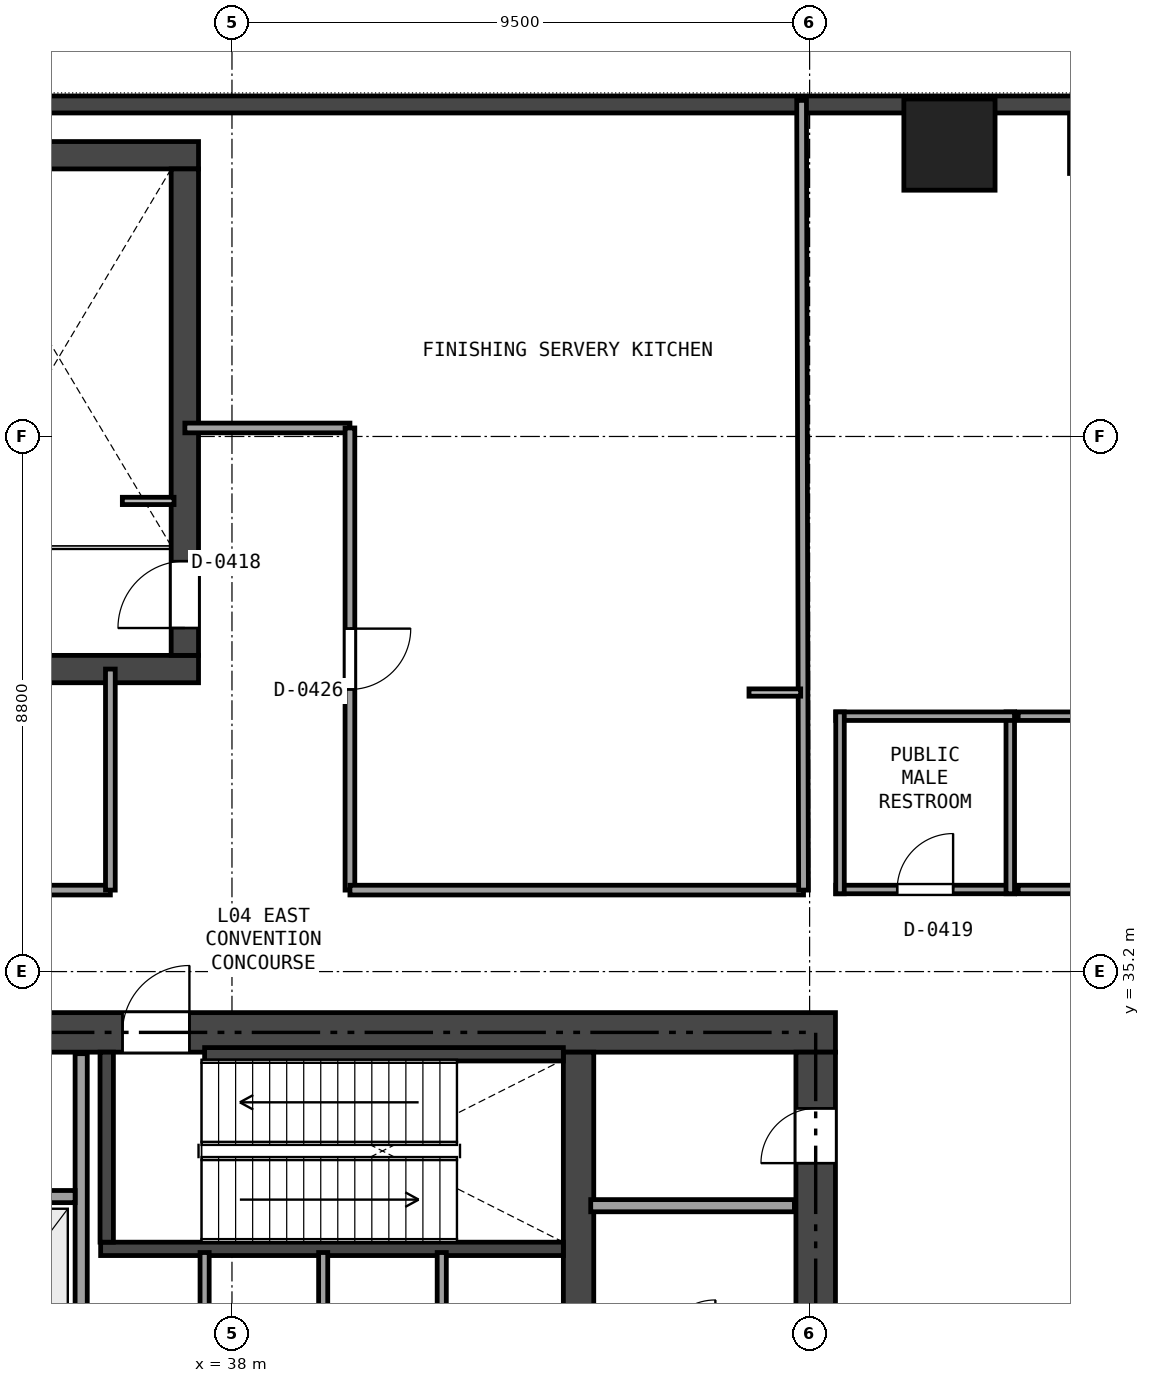
"""IFC4 building model, lengths in metres.
Left out: names, types, materials, properties, quantities, classifications, styles, units other than length and angle.
Written with IfcOpenShell. Run it as: python <this file> out.ifc"""

import sys

from ifc_helpers import new_model, si_unit, direction, frame, frame_2d, origin, origin_2d, place, context, subcontext, project, spatial, rectangle, extrude, element, fill, save


model = new_model("IFC4")
c1 = context("Model", 3, precision=1e-05, world=origin(), true_north=direction((0.0, 1.0)))
c2 = subcontext(c1, "Body", "Model", "MODEL_VIEW")
j1 = project(units=[si_unit("LENGTHUNIT", "METRE"), si_unit("PLANEANGLEUNIT", "RADIAN")], contexts=[c1])
p1 = place(None, origin())
s1 = spatial("IfcSite", under=j1, at=p1, CompositionType="ELEMENT")
p2 = place(p1, origin())
s2 = spatial("IfcBuilding", under=s1, at=p2, CompositionType="ELEMENT")
p3 = place(p2, frame((0.0, 0.0, 21.6)))
s3 = spatial("IfcBuildingStorey", under=s2, at=p3, CompositionType="ELEMENT", Elevation=21.6)
p4 = place(p3, frame((26.475, 34.2, 0.0), z_axis=(0.0, 0.0, 1.0), x_axis=(1.0, 0.0, 0.0)))
e1 = element("IfcWall", 1, at=p4, inside=s3, PredefinedType="SHEAR", context=c2, shape_type="SweptSolid", body=[
    extrude(rectangle(XDim=21.45, YDim=0.65, at=frame_2d((10.725, 0.0))), origin(), (0.0, 0.0, 1.0), 4.98),
])
p5 = place(p4, frame((9.725, 0.0, 0.0)))
e2 = element("IfcOpeningElement", 2, at=p5, cuts=e1, PredefinedType="OPENING", context=c2, shape_type="SweptSolid", body=[
    extrude(rectangle(XDim=1.1, YDim=2.15, at=frame_2d((0.55, 1.075))), frame((0.0, 0.335, 0.0), z_axis=(0.0, -1.0, 0.0), x_axis=(1.0, 0.0, 0.0)), (0.0, 0.0, 1.0), 0.67),
])
p6 = place(p4, frame((1.975, 0.0, 0.0)))
e3 = element("IfcOpeningElement", 3, at=p6, cuts=e1, PredefinedType="OPENING", context=c2, shape_type="SweptSolid", body=[
    extrude(rectangle(XDim=0.9, YDim=2.1, at=frame_2d((0.45, 1.05))), frame((0.0, 0.335, 0.0), z_axis=(0.0, -1.0, 0.0), x_axis=(1.0, 0.0, 0.0)), (0.0, 0.0, 1.0), 0.67),
])
p7 = place(p4, frame((6.275, 0.0, 0.0)))
e4 = element("IfcOpeningElement", 4, at=p7, cuts=e1, PredefinedType="OPENING", context=c2, shape_type="SweptSolid", body=[
    extrude(rectangle(XDim=0.9, YDim=2.1, at=frame_2d((0.45, 1.05))), frame((0.0, 0.335, 0.0), z_axis=(0.0, -1.0, 0.0), x_axis=(1.0, 0.0, 0.0)), (0.0, 0.0, 1.0), 0.67),
])
p8 = place(p3, frame((47.6, 18.925, 0.0), z_axis=(0.0, 0.0, 1.0), x_axis=(0.0, 1.0, 0.0)))
e5 = element("IfcWall", 5, at=p8, inside=s3, PredefinedType="SHEAR", context=c2, shape_type="SweptSolid", body=[
    extrude(rectangle(XDim=14.95, YDim=0.65, at=frame_2d((7.475, 0.0))), origin(), (0.0, 0.0, 1.0), 4.98),
])
p9 = place(p8, frame((6.575, 0.0, 0.0)))
e6 = element("IfcOpeningElement", 6, at=p9, cuts=e5, PredefinedType="OPENING", context=c2, shape_type="SweptSolid", body=[
    extrude(rectangle(XDim=1.1, YDim=2.15, at=frame_2d((0.55, 1.075))), frame((0.0, 0.335, 0.0), z_axis=(0.0, -1.0, 0.0), x_axis=(1.0, 0.0, 0.0)), (0.0, 0.0, 1.0), 0.67),
])
p10 = place(p8, frame((8.475, 0.0, 0.0)))
e7 = element("IfcOpeningElement", 7, at=p10, cuts=e5, PredefinedType="OPENING", context=c2, shape_type="SweptSolid", body=[
    extrude(rectangle(XDim=0.9, YDim=2.1, at=frame_2d((0.45, 1.05))), frame((0.0, 0.335, 0.0), z_axis=(0.0, -1.0, 0.0), x_axis=(1.0, 0.0, 0.0)), (0.0, 0.0, 1.0), 0.67),
])
p11 = place(p8, frame((13.125, 0.0, 0.0)))
e8 = element("IfcOpeningElement", 8, at=p11, cuts=e5, PredefinedType="OPENING", context=c2, shape_type="SweptSolid", body=[
    extrude(rectangle(XDim=0.9, YDim=2.1, at=frame_2d((0.45, 1.05))), frame((0.0, 0.335, 0.0), z_axis=(0.0, -1.0, 0.0), x_axis=(1.0, 0.0, 0.0)), (0.0, 0.0, 1.0), 0.67),
])
p12 = place(p3, frame((43.7, 18.925, 0.0), z_axis=(0.0, 0.0, 1.0), x_axis=(0.0, 1.0, 0.0)))
e9 = element("IfcWall", 9, at=p12, inside=s3, PredefinedType="SHEAR", context=c2, shape_type="SweptSolid", body=[
    extrude(rectangle(XDim=14.95, YDim=0.5, at=frame_2d((7.475, 0.0))), origin(), (0.0, 0.0, 1.0), 4.98),
])
p13 = place(p12, frame((8.075, 0.0, 0.0)))
e10 = element("IfcOpeningElement", 10, at=p13, cuts=e9, PredefinedType="OPENING", context=c2, shape_type="SweptSolid", body=[
    extrude(rectangle(XDim=0.9, YDim=2.1, at=frame_2d((0.45, 1.05))), frame((0.0, 0.26, 0.0), z_axis=(0.0, -1.0, 0.0), x_axis=(1.0, 0.0, 0.0)), (0.0, 0.0, 1.0), 0.52),
])
p14 = place(p3, frame((35.84, 30.64, 0.0), z_axis=(0.0, 0.0, 1.0), x_axis=(1.0, 0.0, 0.0)))
e11 = element("IfcWall", 11, at=p14, inside=s3, PredefinedType="SHEAR", context=c2, shape_type="SweptSolid", body=[
    extrude(rectangle(XDim=7.61, YDim=0.22, at=frame_2d((3.805, 0.0))), origin(), (0.0, 0.0, 1.0), 4.98),
])
p15 = place(p3, frame((35.94, 30.75, 0.0), z_axis=(0.0, 0.0, 1.0), x_axis=(0.0, 1.0, 0.0)))
e12 = element("IfcWall", 12, at=p15, inside=s3, PredefinedType="SHEAR", context=c2, shape_type="SweptSolid", body=[
    extrude(rectangle(XDim=3.125, YDim=0.22, at=frame_2d((1.562, 0.0))), origin(), (0.0, 0.0, 1.0), 4.98),
])
p16 = place(p3, frame((37.55, 33.84, 0.0), z_axis=(0.0, 0.0, 1.0), x_axis=(1.0, 0.0, 0.0)))
e13 = element("IfcWall", 13, at=p16, inside=s3, PredefinedType="SHEAR", context=c2, shape_type="SweptSolid", body=[
    extrude(rectangle(XDim=5.9, YDim=0.22, at=frame_2d((2.95, 0.0))), origin(), (0.0, 0.0, 1.0), 4.98),
])
for number, where, z_axis, x_axis in (
    (14, (32.85, 40.175, 0.0), (0.0, 0.0, 1.0), (1.0, 0.0, 0.0)),
    (15, (32.85, 48.625, 0.0), (0.0, 0.0, 1.0), (1.0, 0.0, 0.0)),
):
    element("IfcWall", number, at=place(p3, frame(where, z_axis=z_axis, x_axis=x_axis)), inside=s3, PredefinedType="SHEAR", context=c2, shape_type="SweptSolid", body=[
        extrude(rectangle(XDim=4.6, YDim=0.45, at=frame_2d((2.3, 0.0))), origin(), (0.0, 0.0, 1.0), 4.98),
    ])
p17 = place(p3, frame((37.225, 40.4, 0.0), z_axis=(0.0, 0.0, 1.0), x_axis=(0.0, 1.0, 0.0)))
e16 = element("IfcWall", 16, at=p17, inside=s3, PredefinedType="SHEAR", context=c2, shape_type="SweptSolid", body=[
    extrude(rectangle(XDim=8.0, YDim=0.45, at=frame_2d((4.0, 0.0))), origin(), (0.0, 0.0, 1.0), 4.98),
])
p18 = place(p17, frame((0.45, 0.0, 0.0)))
e17 = element("IfcOpeningElement", 17, at=p18, cuts=e16, PredefinedType="OPENING", context=c2, shape_type="SweptSolid", body=[
    extrude(rectangle(XDim=1.1, YDim=2.15, at=frame_2d((0.55, 1.075))), frame((0.0, 0.235, 0.0), z_axis=(0.0, -1.0, 0.0), x_axis=(1.0, 0.0, 0.0)), (0.0, 0.0, 1.0), 0.47),
])
p19 = place(p3, frame((49.8, 48.8, 0.0), z_axis=(0.0, 0.0, 1.0), x_axis=(1.0, 0.0, 0.0)))
e18 = element("IfcColumn", 18, at=p19, inside=s3, PredefinedType="COLUMN", context=c2, shape_type="SweptSolid", body=[
    extrude(rectangle(XDim=1.5, YDim=1.5, at=origin_2d()), origin(), (0.0, 0.0, 1.0), 4.98),
])
p20 = place(p3, frame((52.0, 48.8, 0.0), z_axis=(0.0, 0.0, 1.0), x_axis=(1.0, 0.0, 0.0)))
e19 = element("IfcColumn", 19, at=p20, inside=s3, PredefinedType="PILASTER", context=c2, shape_type="SweptSolid", body=[
    extrude(rectangle(XDim=0.45, YDim=0.95, at=origin_2d()), origin(), (0.0, 0.0, 1.0), 4.98),
])
p21 = place(p3, frame((6.54, 49.46, 0.0), z_axis=(0.0, 0.0, 1.0), x_axis=(1.0, 0.0, 0.0)))
e20 = element("IfcWall", 20, at=p21, inside=s3, PredefinedType="SOLIDWALL", context=c2, shape_type="SweptSolid", body=[
    extrude(rectangle(XDim=61.32, YDim=0.28, at=frame_2d((30.66, 0.0))), origin(), (0.0, 0.0, 1.0), 4.98),
])
p22 = place(p3, frame((43.9, 31.35, 0.0), z_axis=(0.0, 0.0, 1.0), x_axis=(1.0, 0.0, 0.0)))
e21 = element("IfcWall", 21, at=p22, inside=s3, PredefinedType="SOLIDWALL", context=c2, shape_type="SweptSolid", body=[
    extrude(rectangle(XDim=3.35, YDim=0.2, at=frame_2d((1.675, 0.0))), origin(), (0.0, 0.0, 1.0), 4.98),
])
p23 = place(p3, frame((35.52, 18.95, 0.0), z_axis=(0.0, 0.0, 1.0), x_axis=(0.0, 1.0, 0.0)))
e22 = element("IfcWall", 22, at=p23, inside=s3, PredefinedType="SOLIDWALL", context=c2, shape_type="SweptSolid", body=[
    extrude(rectangle(XDim=14.9, YDim=0.2, at=frame_2d((7.45, 0.0))), origin(), (0.0, 0.0, 1.0), 4.501),
])
p24 = place(p23, frame((7.755, 0.0, 0.0)))
e23 = element("IfcOpeningElement", 23, at=p24, cuts=e22, PredefinedType="OPENING", context=c2, shape_type="SweptSolid", body=[
    extrude(rectangle(XDim=0.95, YDim=2.15, at=frame_2d((0.475, 1.075))), frame((0.0, 0.11, 0.0), z_axis=(0.0, -1.0, 0.0), x_axis=(1.0, 0.0, 0.0)), (0.0, 0.0, 1.0), 0.22),
])
p25 = place(p23, frame((0.6, 0.0, 0.0)))
e24 = element("IfcOpeningElement", 24, at=p25, cuts=e22, PredefinedType="OPENING", context=c2, shape_type="SweptSolid", body=[
    extrude(rectangle(XDim=0.9, YDim=2.1, at=frame_2d((0.45, 1.05))), frame((0.0, 0.11, 0.0), z_axis=(0.0, -1.0, 0.0), x_axis=(1.0, 0.0, 0.0)), (0.0, 0.0, 1.0), 0.22),
])
p26 = place(p3, frame((31.0, 31.5, 0.0), z_axis=(0.0, 0.0, 1.0), x_axis=(1.0, 0.0, 0.0)))
e25 = element("IfcWall", 25, at=p26, inside=s3, PredefinedType="SOLIDWALL", context=c2, shape_type="SweptSolid", body=[
    extrude(rectangle(XDim=4.42, YDim=0.2, at=frame_2d((2.21, 0.0))), origin(), (0.0, 0.0, 1.0), 4.98),
])
for number, where, z_axis, x_axis in (
    (26, (37.55, 28.15, 0.0), (0.0, 0.0, 1.0), (0.0, 1.0, 0.0)),
    (27, (39.5, 28.15, 0.0), (0.0, 0.0, 1.0), (0.0, 1.0, 0.0)),
    (28, (41.45, 28.15, 0.0), (0.0, 0.0, 1.0), (0.0, 1.0, 0.0)),
):
    element("IfcWall", number, at=place(p3, frame(where, z_axis=z_axis, x_axis=x_axis)), inside=s3, PredefinedType="PARTITIONING", context=c2, shape_type="SweptSolid", body=[
        extrude(rectangle(XDim=2.43, YDim=0.15, at=frame_2d((1.215, 0.0))), origin(), (0.0, 0.0, 1.0), 4.98),
    ])
p27 = place(p3, frame((47.93, 36.55, 0.0), z_axis=(0.0, 0.0, 1.0), x_axis=(1.0, 0.0, 0.0)))
e29 = element("IfcWall", 29, at=p27, inside=s3, PredefinedType="PARTITIONING", context=c2, shape_type="SweptSolid", body=[
    extrude(rectangle(XDim=2.94, YDim=0.14, at=frame_2d((1.47, 0.0))), origin(), (0.0, 0.0, 1.0), 3.847),
])
p28 = place(p27, frame((1.01, 0.0, 0.0)))
e30 = element("IfcOpeningElement", 30, at=p28, cuts=e29, PredefinedType="OPENING", context=c2, shape_type="SweptSolid", body=[
    extrude(rectangle(XDim=0.92, YDim=2.1, at=frame_2d((0.46, 1.05))), frame((0.0, 0.08, 0.0), z_axis=(0.0, -1.0, 0.0), x_axis=(1.0, 0.0, 0.0)), (0.0, 0.0, 1.0), 0.16),
])
p29 = place(p3, frame((50.8, 36.48, 0.0), z_axis=(0.0, 0.0, 1.0), x_axis=(0.0, 1.0, 0.0)))
e31 = element("IfcWall", 31, at=p29, inside=s3, PredefinedType="PARTITIONING", context=c2, shape_type="SweptSolid", body=[
    extrude(rectangle(XDim=2.99, YDim=0.14, at=frame_2d((1.495, 0.0))), origin(), (0.0, 0.0, 1.0), 4.609),
])
p30 = place(p3, frame((50.87, 39.4, 0.0), z_axis=(0.0, 0.0, 1.0), x_axis=(-1.0, 0.0, 0.0)))
e32 = element("IfcWall", 32, at=p30, inside=s3, PredefinedType="PARTITIONING", context=c2, shape_type="SweptSolid", body=[
    extrude(rectangle(XDim=2.94, YDim=0.14, at=frame_2d((1.47, 0.0))), origin(), (0.0, 0.0, 1.0), 3.847),
])
p31 = place(p3, frame((48.0, 39.47, 0.0), z_axis=(0.0, 0.0, 1.0), x_axis=(0.0, -1.0, 0.0)))
e33 = element("IfcWall", 33, at=p31, inside=s3, PredefinedType="PARTITIONING", context=c2, shape_type="SweptSolid", body=[
    extrude(rectangle(XDim=2.99, YDim=0.14, at=frame_2d((1.495, 0.0))), origin(), (0.0, 0.0, 1.0), 3.847),
])
p32 = place(p3, frame((50.93, 36.55, 0.0), z_axis=(0.0, 0.0, 1.0), x_axis=(1.0, 0.0, 0.0)))
e34 = element("IfcWall", 34, at=p32, inside=s3, PredefinedType="PARTITIONING", context=c2, shape_type="SweptSolid", body=[
    extrude(rectangle(XDim=2.94, YDim=0.14, at=frame_2d((1.47, 0.0))), origin(), (0.0, 0.0, 1.0), 4.98),
])
p33 = place(p32, frame((0.9, 0.0, 0.0)))
e35 = element("IfcOpeningElement", 35, at=p33, cuts=e34, PredefinedType="OPENING", context=c2, shape_type="SweptSolid", body=[
    extrude(rectangle(XDim=0.92, YDim=2.1, at=frame_2d((0.46, 1.05))), frame((0.0, 0.08, 0.0), z_axis=(0.0, -1.0, 0.0), x_axis=(1.0, 0.0, 0.0)), (0.0, 0.0, 1.0), 0.16),
])
p34 = place(p3, frame((53.87, 39.4, 0.0), z_axis=(0.0, 0.0, 1.0), x_axis=(-1.0, 0.0, 0.0)))
e36 = element("IfcWall", 36, at=p34, inside=s3, PredefinedType="PARTITIONING", context=c2, shape_type="SweptSolid", body=[
    extrude(rectangle(XDim=2.94, YDim=0.14, at=frame_2d((1.47, 0.0))), origin(), (0.0, 0.0, 1.0), 4.609),
])
p35 = place(p3, frame((26.94, 36.54, 0.0), z_axis=(0.0, 0.0, 1.0), x_axis=(1.0, 0.0, 0.0)))
e37 = element("IfcWall", 37, at=p35, inside=s3, PredefinedType="PARTITIONING", context=c2, shape_type="SweptSolid", body=[
    extrude(rectangle(XDim=9.06, YDim=0.16, at=frame_2d((4.53, 0.0))), origin(), (0.0, 0.0, 1.0), 3.847),
])
p36 = place(p35, frame((4.03, 0.0, 0.0)))
e38 = element("IfcOpeningElement", 38, at=p36, cuts=e37, PredefinedType="OPENING", context=c2, shape_type="SweptSolid", body=[
    extrude(rectangle(XDim=1.0, YDim=2.15, at=frame_2d((0.5, 1.075))), frame((0.0, 0.09, 0.0), z_axis=(0.0, -1.0, 0.0), x_axis=(1.0, 0.0, 0.0)), (0.0, 0.0, 1.0), 0.18),
])
p37 = place(p3, frame((36.0, 36.54, 0.0), z_axis=(0.0, 0.0, 1.0), x_axis=(0.0, 1.0, 0.0)))
e39 = element("IfcWall", 39, at=p37, inside=s3, PredefinedType="PARTITIONING", context=c2, shape_type="SweptSolid", body=[
    extrude(rectangle(XDim=3.635, YDim=0.16, at=frame_2d((1.817, 0.0))), origin(), (0.0, 0.0, 1.0), 4.98),
])
p38 = place(p3, frame((37.225, 44.14, 0.0), z_axis=(0.0, 0.0, 1.0), x_axis=(1.0, 0.0, 0.0)))
e40 = element("IfcWall", 40, at=p38, inside=s3, PredefinedType="PARTITIONING", context=c2, shape_type="SweptSolid", body=[
    extrude(rectangle(XDim=2.715, YDim=0.16, at=frame_2d((1.357, 0.0))), origin(), (0.0, 0.0, 1.0), 4.98),
])
p39 = place(p3, frame((39.94, 44.14, 0.0), z_axis=(0.0, 0.0, 1.0), x_axis=(0.0, -1.0, 0.0)))
e41 = element("IfcWall", 41, at=p39, inside=s3, PredefinedType="PARTITIONING", context=c2, shape_type="SweptSolid", body=[
    extrude(rectangle(XDim=7.6, YDim=0.16, at=frame_2d((3.8, 0.0))), origin(), (0.0, 0.0, 1.0), 4.98),
])
p40 = place(p39, frame((3.3, 0.0, 0.0)))
e42 = element("IfcOpeningElement", 42, at=p40, cuts=e41, PredefinedType="OPENING", context=c2, shape_type="SweptSolid", body=[
    extrude(rectangle(XDim=1.0, YDim=2.15, at=frame_2d((0.5, 1.075))), frame((0.0, 0.09, 0.0), z_axis=(0.0, -1.0, 0.0), x_axis=(1.0, 0.0, 0.0)), (0.0, 0.0, 1.0), 0.18),
])
p41 = place(p3, frame((39.94, 36.54, 0.0), z_axis=(0.0, 0.0, 1.0), x_axis=(1.0, 0.0, 0.0)))
e43 = element("IfcWall", 43, at=p41, inside=s3, PredefinedType="PARTITIONING", context=c2, shape_type="SweptSolid", body=[
    extrude(rectangle(XDim=7.46, YDim=0.16, at=frame_2d((3.73, 0.0))), origin(), (0.0, 0.0, 1.0), 3.847),
])
p42 = place(p3, frame((47.4, 36.54, 0.0), z_axis=(0.0, 0.0, 1.0), x_axis=(-0.002462629999, 0.999996967722, 0.0)))
e44 = element("IfcWall", 44, at=p42, inside=s3, PredefinedType="PARTITIONING", context=c2, shape_type="SweptSolid", body=[
    extrude(rectangle(XDim=12.987, YDim=0.16, at=frame_2d((6.494, 0.0))), origin(), (0.0, 0.0, 1.0), 3.847),
])
p43 = place(p5, origin())
e45 = element("IfcDoor", 45, at=p43, inside=s3, OperationType="SINGLE_SWING_RIGHT", PredefinedType="DOOR", context=c2, shape_type="SweptSolid", body=[
    extrude(rectangle(XDim=1.1, YDim=2.15, at=frame_2d((0.55, 1.075))), frame((0.0, 0.025, 0.0), z_axis=(0.0, -1.0, 0.0), x_axis=(1.0, 0.0, 0.0)), (0.0, 0.0, 1.0), 0.05),
])
fill(e2, e45)
p44 = place(p11, origin())
e46 = element("IfcDoor", 46, at=p44, inside=s3, OperationType="SINGLE_SWING_LEFT", PredefinedType="DOOR", context=c2, shape_type="SweptSolid", body=[
    extrude(rectangle(XDim=0.9, YDim=2.1, at=frame_2d((0.45, 1.05))), frame((0.0, 0.025, 0.0), z_axis=(0.0, -1.0, 0.0), x_axis=(1.0, 0.0, 0.0)), (0.0, 0.0, 1.0), 0.05),
])
fill(e8, e46)
p45 = place(p18, origin())
e47 = element("IfcDoor", 47, at=p45, inside=s3, OperationType="SINGLE_SWING_LEFT", PredefinedType="DOOR", context=c2, shape_type="SweptSolid", body=[
    extrude(rectangle(XDim=1.1, YDim=2.15, at=frame_2d((0.55, 1.075))), frame((0.0, 0.025, 0.0), z_axis=(0.0, -1.0, 0.0), x_axis=(1.0, 0.0, 0.0)), (0.0, 0.0, 1.0), 0.05),
])
fill(e17, e47)
p46 = place(p28, origin())
e48 = element("IfcDoor", 48, at=p46, inside=s3, OperationType="SINGLE_SWING_RIGHT", PredefinedType="DOOR", context=c2, shape_type="SweptSolid", body=[
    extrude(rectangle(XDim=0.92, YDim=2.1, at=frame_2d((0.46, 1.05))), frame((0.0, 0.025, 0.0), z_axis=(0.0, -1.0, 0.0), x_axis=(1.0, 0.0, 0.0)), (0.0, 0.0, 1.0), 0.05),
])
fill(e30, e48)
p47 = place(p40, origin())
e49 = element("IfcDoor", 49, at=p47, inside=s3, OperationType="SINGLE_SWING_LEFT", PredefinedType="DOOR", context=c2, shape_type="SweptSolid", body=[
    extrude(rectangle(XDim=1.0, YDim=2.15, at=frame_2d((0.5, 1.075))), frame((0.0, 0.025, 0.0), z_axis=(0.0, -1.0, 0.0), x_axis=(1.0, 0.0, 0.0)), (0.0, 0.0, 1.0), 0.05),
])
fill(e42, e49)
save(model, sys.argv[1])
